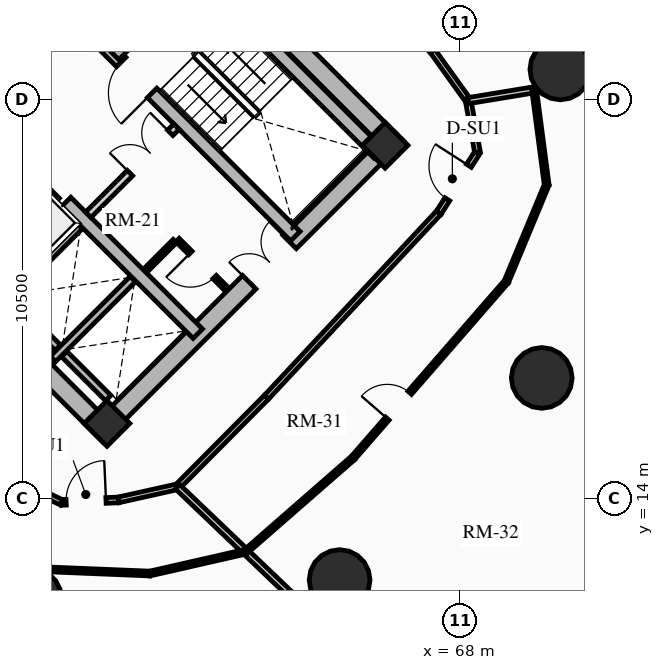
"""IFC4 building model, lengths in metres.
Left out: names, types, materials, properties, quantities, classifications, styles, units other than length and angle.
Written with IfcOpenShell. Run it as: python <this file> out.ifc"""

import sys

from ifc_helpers import new_model, si_unit, direction, frame, frame_2d, origin, origin_2d, place, context, subcontext, project, spatial, rectangle, circle, extrude, source, transform, mapped, element, fill, save


model = new_model("IFC4")
c1 = context("Model", 3, precision=1e-05, world=origin(), true_north=direction((0.0, 1.0)))
c2 = subcontext(c1, "Body", "Model", "MODEL_VIEW")
j1 = project(units=[si_unit("LENGTHUNIT", "METRE"), si_unit("PLANEANGLEUNIT", "RADIAN")], contexts=[c1])
p1 = place(None, origin())
s1 = spatial("IfcSite", under=j1, at=p1, CompositionType="ELEMENT")
p2 = place(p1, origin())
s2 = spatial("IfcBuilding", under=s1, at=p2, CompositionType="ELEMENT")
p3 = place(p2, frame((0.0, 0.0, 59.83)))
s3 = spatial("IfcBuildingStorey", under=s2, at=p3, CompositionType="ELEMENT", Elevation=59.83)
for number, where, z_axis, x_axis in (
    (1, (58.773, 15.661, 0.0), (0.0, 0.0, 1.0), (-0.707, 0.707, 0.0)),
    (2, (66.339, 23.227, 0.0), (0.0, 0.0, 1.0), (-0.707, 0.707, 0.0)),
):
    element("IfcWall", number, at=place(p3, frame(where, z_axis=z_axis, x_axis=x_axis)), inside=s3, PredefinedType="SHEAR", context=c2, shape_type="SweptSolid", body=[
        extrude(rectangle(XDim=14.3, YDim=0.5, at=frame_2d((7.15, 0.0))), origin(), (0.0, 0.0, 1.0), 2.91),
    ])
p4 = place(p3, frame((58.596, 15.838, 0.0), z_axis=(0.0, 0.0, 1.0), x_axis=(0.707106781187, 0.707106781187, 0.0)))
e3 = element("IfcWall", 3, at=p4, inside=s3, PredefinedType="SHEAR", context=c2, shape_type="SweptSolid", body=[
    extrude(rectangle(XDim=10.7, YDim=0.5, at=frame_2d((5.35, 0.0))), origin(), (0.0, 0.0, 1.0), 2.91),
])
m1 = source(origin(), c2, "Body", "SweptSolid", [
    extrude(rectangle(XDim=1.5, YDim=2.02, at=frame_2d((0.75, 1.01))), frame((0.0, 0.26, 0.0), z_axis=(0.0, -1.0, 0.0), x_axis=(1.0, 0.0, 0.0)), (0.0, 0.0, 1.0), 0.52),
])
p5 = place(p4, frame((5.45, 0.0, 0.0)))
e4 = element("IfcOpeningElement", 4, at=p5, cuts=e3, PredefinedType="OPENING", context=c2, shape_type="MappedRepresentation", body=[
    mapped(m1, transform((0.0, 0.0, 0.0), x_axis=(1.0, 0.0, 0.0), y_axis=(0.0, 1.0, 0.0), z_axis=(0.0, 0.0, 1.0), scale=1.0)),
])
p6 = place(p3, frame((61.096, 18.338, 0.0), z_axis=(0.0, 0.0, 1.0), x_axis=(-0.707106781187, 0.707106781187, 0.0)))
e5 = element("IfcWall", 5, at=p6, inside=s3, PredefinedType="SHEAR", context=c2, shape_type="SweptSolid", body=[
    extrude(rectangle(XDim=13.8, YDim=0.35, at=frame_2d((6.9, 0.0))), origin(), (0.0, 0.0, 1.0), 2.91),
])
m2 = source(origin(), c2, "Body", "SweptSolid", [
    extrude(rectangle(XDim=1.1, YDim=2.015, at=frame_2d((0.55, 1.007))), frame((0.0, 0.185, 0.0), z_axis=(0.0, -1.0, 0.0), x_axis=(1.0, 0.0, 0.0)), (0.0, 0.0, 1.0), 0.37),
])
p7 = place(p6, frame((4.9, 0.0, 0.0)))
e6 = element("IfcOpeningElement", 6, at=p7, cuts=e5, PredefinedType="OPENING", context=c2, shape_type="MappedRepresentation", body=[
    mapped(m2, transform((0.0, 0.0, 0.0), x_axis=(1.0, 0.0, 0.0), y_axis=(0.0, 1.0, 0.0), z_axis=(0.0, 0.0, 1.0), scale=1.0)),
])
m3 = source(origin(), c2, "Body", "SweptSolid", [
    extrude(rectangle(XDim=1.15, YDim=2.02, at=frame_2d((0.575, 1.01))), frame((0.0, 0.185, 0.0), z_axis=(0.0, -1.0, 0.0), x_axis=(1.0, 0.0, 0.0)), (0.0, 0.0, 1.0), 0.37),
])
p8 = place(p6, frame((7.32, 0.0, 0.0)))
e7 = element("IfcOpeningElement", 7, at=p8, cuts=e5, PredefinedType="OPENING", context=c2, shape_type="MappedRepresentation", body=[
    mapped(m3, transform((0.0, 0.0, 0.0), x_axis=(1.0, 0.0, 0.0), y_axis=(0.0, 1.0, 0.0), z_axis=(0.0, 0.0, 1.0), scale=1.0)),
])
p9 = place(p3, frame((63.662, 20.904, 0.0), z_axis=(0.0, 0.0, 1.0), x_axis=(-0.707106781187, 0.707106781187, 0.0)))
e8 = element("IfcWall", 8, at=p9, inside=s3, PredefinedType="SHEAR", context=c2, shape_type="SweptSolid", body=[
    extrude(rectangle(XDim=13.8, YDim=0.35, at=frame_2d((6.9, 0.0))), origin(), (0.0, 0.0, 1.0), 2.91),
])
p10 = place(p9, frame((10.025, 0.0, 0.0)))
e9 = element("IfcOpeningElement", 9, at=p10, cuts=e8, PredefinedType="OPENING", context=c2, shape_type="MappedRepresentation", body=[
    mapped(m2, transform((0.0, 0.0, 0.0), x_axis=(1.0, 0.0, 0.0), y_axis=(0.0, 1.0, 0.0), z_axis=(0.0, 0.0, 1.0), scale=1.0)),
])
p11 = place(p9, frame((12.025, 0.0, 0.0)))
e10 = element("IfcOpeningElement", 10, at=p11, cuts=e8, PredefinedType="OPENING", context=c2, shape_type="MappedRepresentation", body=[
    mapped(m2, transform((0.0, 0.0, 0.0), x_axis=(1.0, 0.0, 0.0), y_axis=(0.0, 1.0, 0.0), z_axis=(0.0, 0.0, 1.0), scale=1.0)),
])
p12 = place(p9, frame((5.33, 0.0, 0.0)))
e11 = element("IfcOpeningElement", 11, at=p12, cuts=e8, PredefinedType="OPENING", context=c2, shape_type="MappedRepresentation", body=[
    mapped(m3, transform((0.0, 0.0, 0.0), x_axis=(1.0, 0.0, 0.0), y_axis=(0.0, 1.0, 0.0), z_axis=(0.0, 0.0, 1.0), scale=1.0)),
])
p13 = place(p3, frame((65.847, 23.089, 0.0), z_axis=(0.0, 0.0, 1.0), x_axis=(-0.707106781187, 0.707106781187, 0.0)))
e12 = element("IfcWall", 12, at=p13, inside=s3, PredefinedType="SHEAR", context=c2, shape_type="SweptSolid", body=[
    extrude(rectangle(XDim=6.745, YDim=0.35, at=frame_2d((3.373, 0.0))), origin(), (0.0, 0.0, 1.0), 2.91),
])
p14 = place(p3, frame((58.893, 25.674, 0.0), z_axis=(0.0, 0.0, 1.0), x_axis=(0.707106781187, 0.707106781187, 0.0)))
e13 = element("IfcWall", 13, at=p14, inside=s3, PredefinedType="SHEAR", context=c2, shape_type="SweptSolid", body=[
    extrude(rectangle(XDim=3.285, YDim=0.35, at=frame_2d((1.643, 0.0))), origin(), (0.0, 0.0, 1.0), 2.91),
])
for number, where, z_axis, x_axis in (
    (14, (58.706, 15.976, 0.0), (0.0, 0.0, 1.0), (0.707, 0.707, 0.0)),
    (15, (66.024, 23.294, 0.0), (0.0, 0.0, 1.0), (0.707, 0.707, 0.0)),
):
    element("IfcColumn", number, at=place(p3, frame(where, z_axis=z_axis, x_axis=x_axis)), inside=s3, PredefinedType="COLUMN", context=c2, shape_type="SweptSolid", body=[
        extrude(rectangle(XDim=0.85, YDim=0.85, at=origin_2d()), origin(), (0.0, 0.0, 1.0), 2.91),
    ])
for number, where, z_axis, x_axis in (
    (16, (56.709, 11.365, 0.0), (0.0, 0.0, 1.0), (1.0, 0.0, 0.0)),
    (17, (64.827, 11.854, 0.0), (0.0, 0.0, 1.0), (1.0, 0.0, 0.0)),
    (18, (70.146, 17.173, 0.0), (0.0, 0.0, 1.0), (1.0, 0.0, 0.0)),
    (19, (70.635, 25.291, 0.0), (0.0, 0.0, 1.0), (1.0, 0.0, 0.0)),
):
    element("IfcColumn", number, at=place(p3, frame(where, z_axis=z_axis, x_axis=x_axis)), inside=s3, PredefinedType="USERDEFINED", context=c2, shape_type="SweptSolid", body=[
        extrude(circle(Radius=0.8, at=origin_2d()), origin(), (0.0, 0.0, 1.0), 2.91),
    ])
p15 = place(p3, frame((73.814, 15.031, 0.0), z_axis=(0.0, 0.0, 1.0), x_axis=(-0.559638693991, -0.828736708604, 0.0)))
e20 = element("IfcWall", 20, at=p15, inside=s3, PredefinedType="SOLIDWALL", context=c2, shape_type="SweptSolid", body=[
    extrude(rectangle(XDim=4.93, YDim=0.24, at=frame_2d((2.465, 0.0))), origin(), (0.0, 0.0, 1.0), 2.073),
])
m4 = source(origin(), c2, "Body", "SweptSolid", [
    extrude(rectangle(XDim=2.2, YDim=1.35, at=frame_2d((1.1, 0.675))), frame((0.0, 0.13, 0.0), z_axis=(0.0, -1.0, 0.0), x_axis=(1.0, 0.0, 0.0)), (0.0, 0.0, 1.0), 0.26),
])
p16 = place(p15, frame((1.365, 0.0, 0.65)))
e21 = element("IfcOpeningElement", 21, at=p16, cuts=e20, PredefinedType="OPENING", context=c2, shape_type="MappedRepresentation", body=[
    mapped(m4, transform((0.0, 0.0, 0.0), x_axis=(1.0, 0.0, 0.0), y_axis=(0.0, 1.0, 0.0), z_axis=(0.0, 0.0, 1.0), scale=1.0)),
])
p17 = place(p3, frame((55.888, 19.069, 0.0), z_axis=(0.0, 0.0, 1.0), x_axis=(0.707106781187, 0.707106781187, 0.0)))
e22 = element("IfcWall", 22, at=p17, inside=s3, PredefinedType="SHEAR", context=c2, shape_type="SweptSolid", body=[
    extrude(rectangle(XDim=2.97, YDim=0.2, at=frame_2d((1.485, 0.0))), origin(), (0.0, 0.0, 1.0), 2.91),
])
p18 = place(p3, frame((57.284, 17.673, 0.0), z_axis=(0.0, 0.0, 1.0), x_axis=(0.707147878904, 0.70706568108, 0.0)))
e23 = element("IfcWall", 23, at=p18, inside=s3, PredefinedType="SHEAR", context=c2, shape_type="SweptSolid", body=[
    extrude(rectangle(XDim=2.97, YDim=0.2, at=frame_2d((1.485, 0.0))), origin(), (0.0, 0.0, 1.0), 2.91),
])
p19 = place(p3, frame((57.412, 17.97, 0.0), z_axis=(0.0, 0.0, 1.0), x_axis=(-0.707106781187, 0.707106781187, 0.0)))
e24 = element("IfcWall", 24, at=p19, inside=s3, PredefinedType="SHEAR", context=c2, shape_type="SweptSolid", body=[
    extrude(rectangle(XDim=1.735, YDim=0.2, at=frame_2d((0.867, 0.0))), origin(), (0.0, 0.0, 1.0), 2.91),
])
p20 = place(p3, frame((58.737, 16.644, 0.0), z_axis=(0.0, 0.0, 1.0), x_axis=(-0.707032117043, 0.707181437447, 0.0)))
e25 = element("IfcWall", 25, at=p20, inside=s3, PredefinedType="SHEAR", context=c2, shape_type="SweptSolid", body=[
    extrude(rectangle(XDim=1.635, YDim=0.2, at=frame_2d((0.817, 0.0))), origin(), (0.0, 0.0, 1.0), 2.91),
])
p21 = place(p3, frame((58.214, 21.467, 0.0), z_axis=(0.0, 0.0, 1.0), x_axis=(0.707106781187, 0.707106781187, 0.0)))
e26 = element("IfcWall", 26, at=p21, inside=s3, PredefinedType="PARTITIONING", context=c2, shape_type="SweptSolid", body=[
    extrude(rectangle(XDim=3.28, YDim=0.2, at=frame_2d((1.64, 0.0))), origin(), (0.0, 0.0, 1.0), 2.635),
])
m5 = source(origin(), c2, "Body", "SweptSolid", [
    extrude(rectangle(XDim=1.5, YDim=2.02, at=frame_2d((0.75, 1.01))), frame((0.0, 0.11, 0.0), z_axis=(0.0, -1.0, 0.0), x_axis=(1.0, 0.0, 0.0)), (0.0, 0.0, 1.0), 0.22),
])
p22 = place(p21, frame((1.55, 0.0, 0.0)))
e27 = element("IfcOpeningElement", 27, at=p22, cuts=e26, PredefinedType="OPENING", context=c2, shape_type="MappedRepresentation", body=[
    mapped(m5, transform((0.0, 0.0, 0.0), x_axis=(1.0, 0.0, 0.0), y_axis=(0.0, 1.0, 0.0), z_axis=(0.0, 0.0, 1.0), scale=1.0)),
])
p23 = place(p3, frame((54.961, 24.719, 0.0), z_axis=(0.0, 0.0, 1.0), x_axis=(0.707106781187, 0.707106781187, 0.0)))
e28 = element("IfcWall", 28, at=p23, inside=s3, PredefinedType="PARTITIONING", context=c2, shape_type="SweptSolid", body=[
    extrude(rectangle(XDim=3.28, YDim=0.2, at=frame_2d((1.64, 0.0))), origin(), (0.0, 0.0, 1.0), 2.635),
])
m6 = source(origin(), c2, "Body", "SweptSolid", [
    extrude(rectangle(XDim=0.9, YDim=2.005, at=frame_2d((0.45, 1.002))), frame((0.0, 0.11, 0.0), z_axis=(0.0, -1.0, 0.0), x_axis=(1.0, 0.0, 0.0)), (0.0, 0.0, 1.0), 0.22),
])
p24 = place(p23, frame((0.16, 0.0, 0.0)))
e29 = element("IfcOpeningElement", 29, at=p24, cuts=e28, PredefinedType="OPENING", context=c2, shape_type="MappedRepresentation", body=[
    mapped(m6, transform((0.0, 0.0, 0.0), x_axis=(1.0, 0.0, 0.0), y_axis=(0.0, 1.0, 0.0), z_axis=(0.0, 0.0, 1.0), scale=1.0)),
])
p25 = place(p3, frame((61.835, 19.529, 0.0), z_axis=(0.0, 0.0, 1.0), x_axis=(-0.707174592913, 0.707038962956, 0.0)))
e30 = element("IfcWall", 30, at=p25, inside=s3, PredefinedType="PARTITIONING", context=c2, shape_type="SweptSolid", body=[
    extrude(rectangle(XDim=1.8, YDim=0.125, at=frame_2d((0.9, 0.0))), origin(), (0.0, 0.0, 1.0), 2.635),
])
m7 = source(origin(), c2, "Body", "SweptSolid", [
    extrude(rectangle(XDim=0.9, YDim=2.005, at=frame_2d((0.45, 1.002))), frame((0.0, 0.073, 0.0), z_axis=(0.0, -1.0, 0.0), x_axis=(1.0, 0.0, 0.0)), (0.0, 0.0, 1.0), 0.145),
])
p26 = place(p25, frame((0.42, 0.0, 0.0)))
e31 = element("IfcOpeningElement", 31, at=p26, cuts=e30, PredefinedType="OPENING", context=c2, shape_type="MappedRepresentation", body=[
    mapped(m7, transform((0.0, 0.0, 0.0), x_axis=(1.0, 0.0, 0.0), y_axis=(0.0, 1.0, 0.0), z_axis=(0.0, 0.0, 1.0), scale=1.0)),
])
p27 = place(p3, frame((59.713, 19.996, 0.0), z_axis=(0.0, 0.0, 1.0), x_axis=(0.707217726, 0.706995818963, 0.0)))
e32 = element("IfcWall", 32, at=p27, inside=s3, PredefinedType="PARTITIONING", context=c2, shape_type="SweptSolid", body=[
    extrude(rectangle(XDim=1.1, YDim=0.125, at=frame_2d((0.55, 0.0))), origin(), (0.0, 0.0, 1.0), 2.635),
])
p28 = place(p3, frame((56.227, 14.513, 0.0), z_axis=(0.0, 0.0, 1.0), x_axis=(0.901477579283, -0.432825801044, 0.0)))
e33 = element("IfcWall", 33, at=p28, inside=s3, PredefinedType="PARTITIONING", context=c2, shape_type="SweptSolid", body=[
    extrude(rectangle(XDim=1.424, YDim=0.15, at=frame_2d((0.712, 0.0))), origin(), (0.0, 0.0, 1.0), 2.205),
])
p29 = place(p3, frame((57.511, 13.897, 0.0), z_axis=(0.0, 0.0, 1.0), x_axis=(0.999024538494, 0.044158481476, 0.0)))
e34 = element("IfcWall", 34, at=p29, inside=s3, PredefinedType="PARTITIONING", context=c2, shape_type="SweptSolid", body=[
    extrude(rectangle(XDim=1.498, YDim=0.15, at=frame_2d((0.749, 0.0))), origin(), (0.0, 0.0, 1.0), 2.159),
])
m8 = source(origin(), c2, "Body", "SweptSolid", [
    extrude(rectangle(XDim=1.05, YDim=2.015, at=frame_2d((0.525, 1.007))), frame((0.0, 0.085, 0.0), z_axis=(0.0, -1.0, 0.0), x_axis=(1.0, 0.0, 0.0)), (0.0, 0.0, 1.0), 0.17),
])
p30 = place(p29, frame((0.12, 0.0, 0.0)))
e35 = element("IfcOpeningElement", 35, at=p30, cuts=e34, PredefinedType="OPENING", context=c2, shape_type="MappedRepresentation", body=[
    mapped(m8, transform((0.0, 0.0, 0.0), x_axis=(1.0, 0.0, 0.0), y_axis=(0.0, 1.0, 0.0), z_axis=(0.0, 0.0, 1.0), scale=1.0)),
])
p31 = place(p3, frame((59.008, 13.963, 0.0), z_axis=(0.0, 0.0, 1.0), x_axis=(0.976020856791, 0.21767702476, 0.0)))
e36 = element("IfcWall", 36, at=p31, inside=s3, PredefinedType="PARTITIONING", context=c2, shape_type="SweptSolid", body=[
    extrude(rectangle(XDim=1.593, YDim=0.15, at=frame_2d((0.796, 0.0))), origin(), (0.0, 0.0, 1.0), 2.205),
])
p32 = place(p3, frame((60.562, 14.31, 0.0), z_axis=(0.0, 0.0, 1.0), x_axis=(0.704566236161, 0.709638230975, 0.0)))
e37 = element("IfcWall", 37, at=p32, inside=s3, PredefinedType="PARTITIONING", context=c2, shape_type="SweptSolid", body=[
    extrude(rectangle(XDim=3.321, YDim=0.15, at=frame_2d((1.661, 0.0))), origin(), (0.0, 0.0, 1.0), 2.159),
])
p33 = place(p3, frame((62.903, 16.667, 0.0), z_axis=(0.0, 0.0, 1.0), x_axis=(0.682371947497, 0.731005147225, 0.0)))
e38 = element("IfcWall", 38, at=p33, inside=s3, PredefinedType="PARTITIONING", context=c2, shape_type="SweptSolid", body=[
    extrude(rectangle(XDim=6.642, YDim=0.15, at=frame_2d((3.321, 0.0))), origin(), (0.0, 0.0, 1.0), 2.159),
])
p34 = place(p3, frame((67.435, 21.521, 0.0), z_axis=(0.0, 0.0, 1.0), x_axis=(0.540777197838, 0.841165870859, 0.0)))
e39 = element("IfcWall", 39, at=p34, inside=s3, PredefinedType="PARTITIONING", context=c2, shape_type="SweptSolid", body=[
    extrude(rectangle(XDim=1.888, YDim=0.15, at=frame_2d((0.944, 0.0))), origin(), (0.0, 0.0, 1.0), 2.205),
])
p35 = place(p34, frame((0.419, 0.0, 0.0)))
e40 = element("IfcOpeningElement", 40, at=p35, cuts=e39, PredefinedType="OPENING", context=c2, shape_type="MappedRepresentation", body=[
    mapped(m8, transform((0.0, 0.0, 0.0), x_axis=(1.0, 0.0, 0.0), y_axis=(0.0, 1.0, 0.0), z_axis=(0.0, 0.0, 1.0), scale=1.0)),
])
p36 = place(p3, frame((68.456, 23.11, 0.0), z_axis=(0.0, 0.0, 1.0), x_axis=(-0.1772522795, 0.984165448191, 0.0)))
e41 = element("IfcWall", 41, at=p36, inside=s3, PredefinedType="PARTITIONING", context=c2, shape_type="SweptSolid", body=[
    extrude(rectangle(XDim=1.382, YDim=0.15, at=frame_2d((0.691, 0.0))), origin(), (0.0, 0.0, 1.0), 2.159),
])
p37 = place(p3, frame((68.211, 24.469, 0.0), z_axis=(0.0, 0.0, 1.0), x_axis=(-0.583012141368, 0.812463441034, 0.0)))
e42 = element("IfcWall", 42, at=p37, inside=s3, PredefinedType="PARTITIONING", context=c2, shape_type="SweptSolid", body=[
    extrude(rectangle(XDim=1.613, YDim=0.15, at=frame_2d((0.807, 0.0))), origin(), (0.0, 0.0, 1.0), 2.205),
])
p38 = place(p3, frame((67.27, 25.78, 0.0), z_axis=(0.0, 0.0, 1.0), x_axis=(-0.696847842907, 0.717218992942, 0.0)))
e43 = element("IfcWall", 43, at=p38, inside=s3, PredefinedType="PARTITIONING", context=c2, shape_type="SweptSolid", body=[
    extrude(rectangle(XDim=6.004, YDim=0.15, at=frame_2d((3.002, 0.0))), origin(), (0.0, 0.0, 1.0), 2.635),
])
m9 = source(origin(), c2, "Body", "SweptSolid", [
    extrude(rectangle(XDim=1.0, YDim=2.015, at=frame_2d((0.5, 1.007))), frame((0.0, 0.085, 0.0), z_axis=(0.0, -1.0, 0.0), x_axis=(1.0, 0.0, 0.0)), (0.0, 0.0, 1.0), 0.17),
])
p39 = place(p38, frame((2.502, 0.0, 0.0)))
e44 = element("IfcOpeningElement", 44, at=p39, cuts=e43, PredefinedType="OPENING", context=c2, shape_type="MappedRepresentation", body=[
    mapped(m9, transform((0.0, 0.0, 0.0), x_axis=(1.0, 0.0, 0.0), y_axis=(0.0, 1.0, 0.0), z_axis=(0.0, 0.0, 1.0), scale=1.0)),
])
p40 = place(p3, frame((60.562, 14.31, 0.0), z_axis=(0.0, 0.0, 1.0), x_axis=(0.723408813637, -0.690419936236, 0.0)))
e45 = element("IfcWall", 45, at=p40, inside=s3, PredefinedType="PARTITIONING", context=c2, shape_type="SweptSolid", body=[
    extrude(rectangle(XDim=8.844, YDim=0.16, at=frame_2d((4.422, 0.0))), origin(), (0.0, 0.0, 1.0), 2.073),
])
p41 = place(p3, frame((68.211, 24.469, 0.0), z_axis=(0.0, 0.0, 1.0), x_axis=(0.986718695255, 0.162438346562, 0.0)))
e46 = element("IfcWall", 46, at=p41, inside=s3, PredefinedType="PARTITIONING", context=c2, shape_type="SweptSolid", body=[
    extrude(rectangle(XDim=6.281, YDim=0.16, at=frame_2d((3.141, 0.0))), origin(), (0.0, 0.0, 1.0), 2.073),
])
p42 = place(p3, frame((57.231, 12.131, 0.0), z_axis=(0.0, 0.0, 1.0), x_axis=(0.999171636131, -0.040694490436, 0.0)))
e47 = element("IfcWall", 47, at=p42, inside=s3, PredefinedType="PARTITIONING", context=c2, shape_type="SweptSolid", body=[
    extrude(rectangle(XDim=2.604, YDim=0.125, at=frame_2d((1.302, 0.0))), origin(), (0.0, 0.0, 1.0), 2.635),
])
p43 = place(p3, frame((59.833, 12.025, 0.0), z_axis=(0.0, 0.0, 1.0), x_axis=(0.975011214108, 0.222155648959, 0.0)))
e48 = element("IfcWall", 48, at=p43, inside=s3, PredefinedType="PARTITIONING", context=c2, shape_type="SweptSolid", body=[
    extrude(rectangle(XDim=2.586, YDim=0.125, at=frame_2d((1.293, 0.0))), origin(), (0.0, 0.0, 1.0), 2.205),
])
p44 = place(p3, frame((62.354, 12.6, 0.0), z_axis=(0.0, 0.0, 1.0), x_axis=(0.75329750535, 0.657679913357, 0.0)))
e49 = element("IfcWall", 49, at=p44, inside=s3, PredefinedType="PARTITIONING", context=c2, shape_type="SweptSolid", body=[
    extrude(rectangle(XDim=3.753, YDim=0.125, at=frame_2d((1.877, 0.0))), origin(), (0.0, 0.0, 1.0), 2.159),
])
p45 = place(p3, frame((65.181, 15.068, 0.0), z_axis=(0.0, 0.0, 1.0), x_axis=(0.656272116637, 0.754524293131, 0.0)))
e50 = element("IfcWall", 50, at=p45, inside=s3, PredefinedType="PARTITIONING", context=c2, shape_type="SweptSolid", body=[
    extrude(rectangle(XDim=6.147, YDim=0.125, at=frame_2d((3.074, 0.0))), origin(), (0.0, 0.0, 1.0), 2.159),
])
p46 = place(p45, frame((1.372, 0.0, 0.0)))
e51 = element("IfcOpeningElement", 51, at=p46, cuts=e50, PredefinedType="OPENING", context=c2, shape_type="MappedRepresentation", body=[
    mapped(m7, transform((0.0, 0.0, 0.0), x_axis=(1.0, 0.0, 0.0), y_axis=(0.0, 1.0, 0.0), z_axis=(0.0, 0.0, 1.0), scale=1.0)),
])
p47 = place(p3, frame((69.216, 19.707, 0.0), z_axis=(0.0, 0.0, 1.0), x_axis=(0.384483341888, 0.923131929797, 0.0)))
e52 = element("IfcWall", 52, at=p47, inside=s3, PredefinedType="PARTITIONING", context=c2, shape_type="SweptSolid", body=[
    extrude(rectangle(XDim=2.757, YDim=0.125, at=frame_2d((1.378, 0.0))), origin(), (0.0, 0.0, 1.0), 2.205),
])
p48 = place(p3, frame((70.276, 22.252, 0.0), z_axis=(0.0, 0.0, 1.0), x_axis=(-0.130649633398, 0.991428602217, 0.0)))
e53 = element("IfcWall", 53, at=p48, inside=s3, PredefinedType="PARTITIONING", context=c2, shape_type="SweptSolid", body=[
    extrude(rectangle(XDim=2.525, YDim=0.125, at=frame_2d((1.262, 0.0))), origin(), (0.0, 0.0, 1.0), 2.073),
])
m10 = source(origin(), c2, "Body", "SweptSolid", [
    extrude(rectangle(XDim=1.1, YDim=2.015, at=frame_2d((0.55, 1.007))), frame((0.0, 0.025, 0.0), z_axis=(0.0, -1.0, 0.0), x_axis=(1.0, 0.0, 0.0)), (0.0, 0.0, 1.0), 0.05),
])
p49 = place(p7, origin())
e54 = element("IfcDoor", 54, at=p49, inside=s3, OperationType="SLIDING_TO_RIGHT", PredefinedType="DOOR", context=c2, shape_type="MappedRepresentation", body=[
    mapped(m10, transform((0.0, 0.0, 0.0), x_axis=(1.0, 0.0, 0.0), y_axis=(0.0, 1.0, 0.0), z_axis=(0.0, 0.0, 1.0), scale=1.0)),
])
fill(e6, e54)
m11 = source(origin(), c2, "Body", "SweptSolid", [
    extrude(rectangle(XDim=1.15, YDim=2.02, at=frame_2d((0.575, 1.01))), frame((0.0, 0.025, 0.0), z_axis=(0.0, -1.0, 0.0), x_axis=(1.0, 0.0, 0.0)), (0.0, 0.0, 1.0), 0.05),
])
p50 = place(p12, origin())
e55 = element("IfcDoor", 55, at=p50, inside=s3, OperationType="SINGLE_SWING_LEFT", PredefinedType="DOOR", context=c2, shape_type="MappedRepresentation", body=[
    mapped(m11, transform((0.0, 0.0, 0.0), x_axis=(1.0, 0.0, 0.0), y_axis=(0.0, 1.0, 0.0), z_axis=(0.0, 0.0, 1.0), scale=1.0)),
])
fill(e11, e55)
m12 = source(origin(), c2, "Body", "SweptSolid", [
    extrude(rectangle(XDim=1.5, YDim=2.02, at=frame_2d((0.75, 1.01))), frame((0.0, 0.025, 0.0), z_axis=(0.0, -1.0, 0.0), x_axis=(1.0, 0.0, 0.0)), (0.0, 0.0, 1.0), 0.05),
])
p51 = place(p5, origin())
e56 = element("IfcDoor", 56, at=p51, inside=s3, OperationType="DOUBLE_DOOR_SINGLE_SWING", PredefinedType="DOOR", context=c2, shape_type="MappedRepresentation", body=[
    mapped(m12, transform((0.0, 0.0, 0.0), x_axis=(1.0, 0.0, 0.0), y_axis=(0.0, 1.0, 0.0), z_axis=(0.0, 0.0, 1.0), scale=1.0)),
])
fill(e4, e56)
p52 = place(p22, origin())
e57 = element("IfcDoor", 57, at=p52, inside=s3, OperationType="DOUBLE_DOOR_SINGLE_SWING", PredefinedType="DOOR", context=c2, shape_type="MappedRepresentation", body=[
    mapped(m12, transform((0.0, 0.0, 0.0), x_axis=(1.0, 0.0, 0.0), y_axis=(0.0, 1.0, 0.0), z_axis=(0.0, 0.0, 1.0), scale=1.0)),
])
fill(e27, e57)
m13 = source(origin(), c2, "Body", "SweptSolid", [
    extrude(rectangle(XDim=0.9, YDim=2.005, at=frame_2d((0.45, 1.002))), frame((0.0, 0.025, 0.0), z_axis=(0.0, -1.0, 0.0), x_axis=(1.0, 0.0, 0.0)), (0.0, 0.0, 1.0), 0.05),
])
p53 = place(p26, origin())
e58 = element("IfcDoor", 58, at=p53, inside=s3, OperationType="SINGLE_SWING_RIGHT", PredefinedType="DOOR", context=c2, shape_type="MappedRepresentation", body=[
    mapped(m13, transform((0.0, 0.0, 0.0), x_axis=(1.0, 0.0, 0.0), y_axis=(0.0, 1.0, 0.0), z_axis=(0.0, 0.0, 1.0), scale=1.0)),
])
fill(e31, e58)
m14 = source(origin(), c2, "Body", "SweptSolid", [
    extrude(rectangle(XDim=1.05, YDim=2.015, at=frame_2d((0.525, 1.007))), frame((0.0, 0.025, 0.0), z_axis=(0.0, -1.0, 0.0), x_axis=(1.0, 0.0, 0.0)), (0.0, 0.0, 1.0), 0.05),
])
p54 = place(p30, origin())
e59 = element("IfcDoor", 59, at=p54, inside=s3, OperationType="SINGLE_SWING_RIGHT", PredefinedType="DOOR", context=c2, shape_type="MappedRepresentation", body=[
    mapped(m14, transform((0.0, 0.0, 0.0), x_axis=(1.0, 0.0, 0.0), y_axis=(0.0, 1.0, 0.0), z_axis=(0.0, 0.0, 1.0), scale=1.0)),
])
fill(e35, e59)
p55 = place(p35, origin())
e60 = element("IfcDoor", 60, at=p55, inside=s3, OperationType="SINGLE_SWING_RIGHT", PredefinedType="DOOR", context=c2, shape_type="MappedRepresentation", body=[
    mapped(m14, transform((0.0, 0.0, 0.0), x_axis=(1.0, 0.0, 0.0), y_axis=(0.0, 1.0, 0.0), z_axis=(0.0, 0.0, 1.0), scale=1.0)),
])
fill(e40, e60)
p56 = place(p46, origin())
e61 = element("IfcDoor", 61, at=p56, inside=s3, OperationType="SINGLE_SWING_LEFT", PredefinedType="DOOR", context=c2, shape_type="MappedRepresentation", body=[
    mapped(m13, transform((0.0, 0.0, 0.0), x_axis=(1.0, 0.0, 0.0), y_axis=(0.0, 1.0, 0.0), z_axis=(0.0, 0.0, 1.0), scale=1.0)),
])
fill(e51, e61)
save(model, sys.argv[1])
